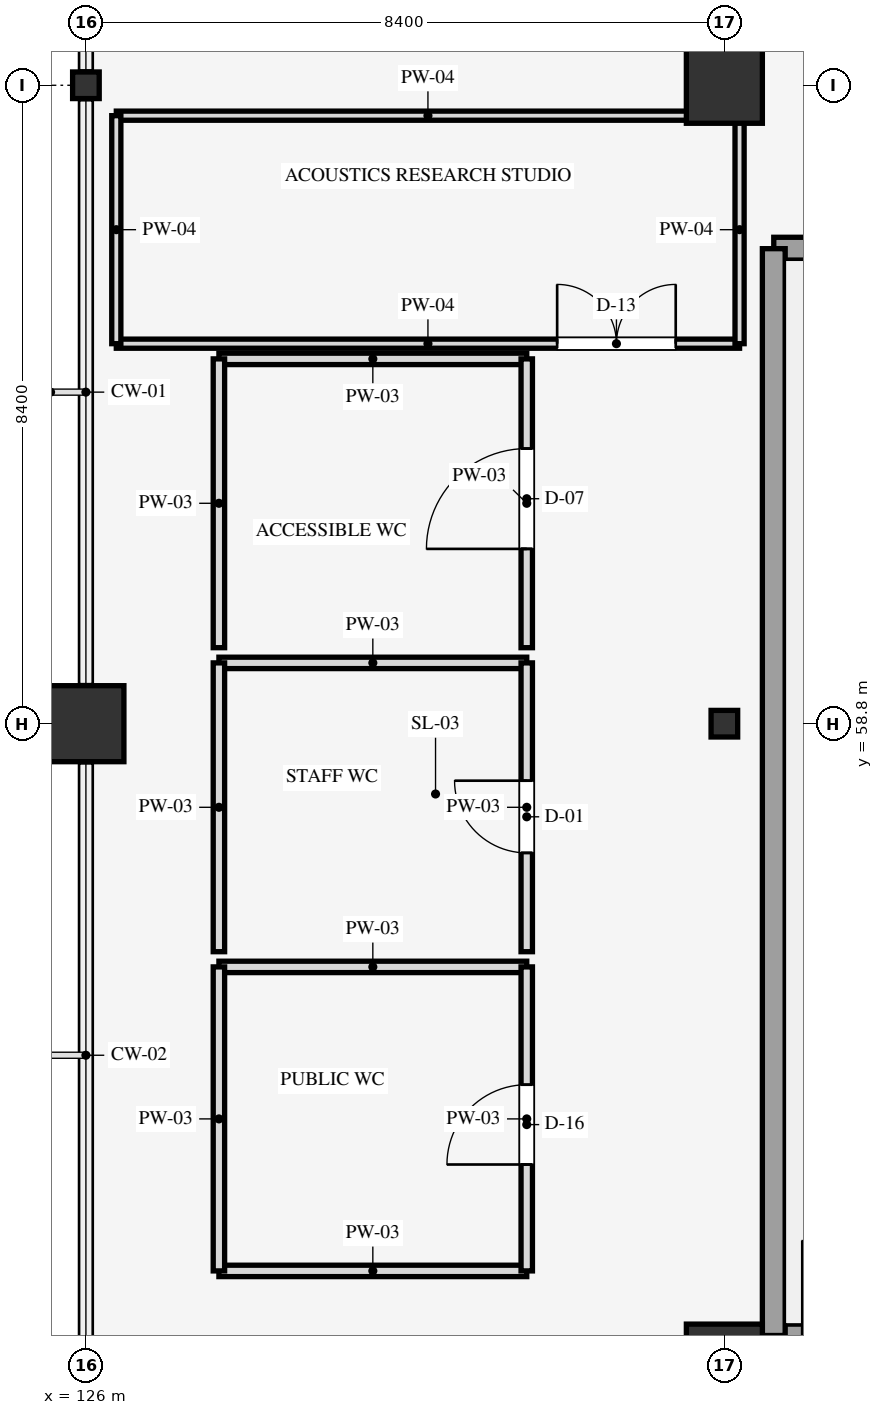
"""IFC4 building model, lengths in metres.
Left out: names, types, materials, properties, quantities, classifications, styles, units other than length and angle.
Written with IfcOpenShell. Run it as: python <this file> out.ifc"""

import sys

from ifc_helpers import new_model, si_unit, direction, frame, frame_2d, origin, origin_2d, place, context, subcontext, project, spatial, rectangle, i_section, extrude, element, fill, save


model = new_model("IFC4")
c1 = context("Model", 3, precision=1e-05, world=origin(), true_north=direction((0.0, 1.0)))
c2 = subcontext(c1, "Body", "Model", "MODEL_VIEW")
j1 = project(units=[si_unit("LENGTHUNIT", "METRE"), si_unit("PLANEANGLEUNIT", "RADIAN")], contexts=[c1])
p1 = place(None, origin())
s1 = spatial("IfcSite", under=j1, at=p1, CompositionType="ELEMENT")
p2 = place(p1, origin())
s2 = spatial("IfcBuilding", under=s1, at=p2, CompositionType="ELEMENT")
p3 = place(p2, frame((0.0, 0.0, 53.1)))
s3 = spatial("IfcBuildingStorey", under=s2, at=p3, CompositionType="ELEMENT", Elevation=53.1)
p4 = place(p3, frame((126.0, 58.8, 0.0), z_axis=(0.0, 0.0, 1.0), x_axis=(1.0, 0.0, 0.0)))
e1 = element("IfcColumn", 1, at=p4, inside=s3, PredefinedType="COLUMN", context=c2, shape_type="SweptSolid", body=[
    extrude(rectangle(XDim=1.0, YDim=1.0, at=origin_2d()), origin(), (0.0, 0.0, 1.0), 4.2),
])
p5 = place(p3, frame((126.0, 67.2, 0.0), z_axis=(0.0, 0.0, 1.0), x_axis=(1.0, 0.0, 0.0)))
e2 = element("IfcColumn", 2, at=p5, inside=s3, PredefinedType="COLUMN", context=c2, shape_type="SweptSolid", body=[
    extrude(i_section(OverallWidth=0.35, OverallDepth=0.35, WebThickness=0.012, FlangeThickness=0.019, FilletRadius=0.02, at=origin_2d()), origin(), (0.0, 0.0, 1.0), 4.2),
])
p6 = place(p3, frame((134.4, 50.4, 0.0), z_axis=(0.0, 0.0, 1.0), x_axis=(1.0, 0.0, 0.0)))
e3 = element("IfcColumn", 3, at=p6, inside=s3, PredefinedType="COLUMN", context=c2, shape_type="SweptSolid", body=[
    extrude(rectangle(XDim=1.0, YDim=1.0, at=origin_2d()), origin(), (0.0, 0.0, 1.0), 4.2),
])
p7 = place(p3, frame((134.4, 58.8, 0.0), z_axis=(0.0, 0.0, 1.0), x_axis=(1.0, 0.0, 0.0)))
e4 = element("IfcColumn", 4, at=p7, inside=s3, PredefinedType="COLUMN", context=c2, shape_type="SweptSolid", body=[
    extrude(i_section(OverallWidth=0.35, OverallDepth=0.35, WebThickness=0.012, FlangeThickness=0.019, FilletRadius=0.02, at=origin_2d()), origin(), (0.0, 0.0, 1.0), 4.2),
])
p8 = place(p3, frame((134.4, 67.2, 0.0), z_axis=(0.0, 0.0, 1.0), x_axis=(1.0, 0.0, 0.0)))
e5 = element("IfcColumn", 5, at=p8, inside=s3, PredefinedType="COLUMN", context=c2, shape_type="SweptSolid", body=[
    extrude(rectangle(XDim=1.0, YDim=1.0, at=origin_2d()), origin(), (0.0, 0.0, 1.0), 4.2),
])
p9 = place(p3, frame((135.05, 50.75, 0.0), z_axis=(0.0, 0.0, 1.0), x_axis=(1.0, 0.0, 0.0)))
e6 = element("IfcWall", 6, at=p9, inside=s3, PredefinedType="SHEAR", context=c2, shape_type="SweptSolid", body=[
    extrude(rectangle(XDim=4.0, YDim=0.3, at=frame_2d((2.0, 0.0))), origin(), (0.0, 0.0, 1.0), 4.2),
])
p10 = place(p9, frame((0.375, 0.0, 0.0)))
e7 = element("IfcOpeningElement", 7, at=p10, cuts=e6, PredefinedType="OPENING", context=c2, shape_type="SweptSolid", body=[
    extrude(rectangle(XDim=1.25, YDim=2.15, at=frame_2d((0.625, 1.075))), frame((0.0, 0.16, 0.0), z_axis=(0.0, -1.0, 0.0), x_axis=(1.0, 0.0, 0.0)), (0.0, 0.0, 1.0), 0.32),
])
p11 = place(p3, frame((135.05, 65.05, 0.0), z_axis=(0.0, 0.0, 1.0), x_axis=(1.0, 0.0, 0.0)))
e8 = element("IfcWall", 8, at=p11, inside=s3, PredefinedType="SHEAR", context=c2, shape_type="SweptSolid", body=[
    extrude(rectangle(XDim=4.0, YDim=0.3, at=frame_2d((2.0, 0.0))), origin(), (0.0, 0.0, 1.0), 4.2),
])
p12 = place(p3, frame((135.05, 50.75, 0.0), z_axis=(0.0, 0.0, 1.0), x_axis=(0.0, 1.0, 0.0)))
e9 = element("IfcWall", 9, at=p12, inside=s3, PredefinedType="SHEAR", context=c2, shape_type="SweptSolid", body=[
    extrude(rectangle(XDim=14.3, YDim=0.3, at=frame_2d((7.15, 0.0))), origin(), (0.0, 0.0, 1.0), 4.2),
])
for number, where, z_axis, x_axis in (
    (10, (127.75, 51.6, 0.0), (0.0, 0.0, 1.0), (1.0, 0.0, 0.0)),
    (11, (127.75, 55.6, 0.0), (0.0, 0.0, 1.0), (1.0, 0.0, 0.0)),
):
    element("IfcWall", number, at=place(p3, frame(where, z_axis=z_axis, x_axis=x_axis)), inside=s3, PredefinedType="PARTITIONING", context=c2, shape_type="SweptSolid", body=[
        extrude(rectangle(XDim=4.05, YDim=0.15, at=frame_2d((2.025, 0.0))), origin(), (0.0, 0.0, 1.0), 3.24),
    ])
p13 = place(p3, frame((127.75, 51.6, 0.0), z_axis=(0.0, 0.0, 1.0), x_axis=(0.0, 1.0, 0.0)))
e12 = element("IfcWall", 12, at=p13, inside=s3, PredefinedType="PARTITIONING", context=c2, shape_type="SweptSolid", body=[
    extrude(rectangle(XDim=4.0, YDim=0.15, at=frame_2d((2.0, 0.0))), origin(), (0.0, 0.0, 1.0), 3.24),
])
p14 = place(p3, frame((131.8, 51.6, 0.0), z_axis=(0.0, 0.0, 1.0), x_axis=(0.0, 1.0, 0.0)))
e13 = element("IfcWall", 13, at=p14, inside=s3, PredefinedType="PARTITIONING", context=c2, shape_type="SweptSolid", body=[
    extrude(rectangle(XDim=4.0, YDim=0.15, at=frame_2d((2.0, 0.0))), origin(), (0.0, 0.0, 1.0), 3.24),
])
p15 = place(p14, frame((1.4, 0.0, 0.0)))
e14 = element("IfcOpeningElement", 14, at=p15, cuts=e13, PredefinedType="OPENING", context=c2, shape_type="SweptSolid", body=[
    extrude(rectangle(XDim=1.05, YDim=2.16, at=frame_2d((0.525, 1.08))), frame((0.0, 0.085, 0.0), z_axis=(0.0, -1.0, 0.0), x_axis=(1.0, 0.0, 0.0)), (0.0, 0.0, 1.0), 0.17),
])
p16 = place(p3, frame((127.75, 59.6, 0.0), z_axis=(0.0, 0.0, 1.0), x_axis=(1.0, 0.0, 0.0)))
e15 = element("IfcWall", 15, at=p16, inside=s3, PredefinedType="PARTITIONING", context=c2, shape_type="SweptSolid", body=[
    extrude(rectangle(XDim=4.05, YDim=0.15, at=frame_2d((2.025, 0.0))), origin(), (0.0, 0.0, 1.0), 3.24),
])
p17 = place(p3, frame((127.75, 55.8, 0.0), z_axis=(0.0, 0.0, 1.0), x_axis=(0.0, 1.0, 0.0)))
e16 = element("IfcWall", 16, at=p17, inside=s3, PredefinedType="PARTITIONING", context=c2, shape_type="SweptSolid", body=[
    extrude(rectangle(XDim=3.8, YDim=0.15, at=frame_2d((1.9, 0.0))), origin(), (0.0, 0.0, 1.0), 3.24),
])
p18 = place(p3, frame((131.8, 55.8, 0.0), z_axis=(0.0, 0.0, 1.0), x_axis=(0.0, 1.0, 0.0)))
e17 = element("IfcWall", 17, at=p18, inside=s3, PredefinedType="PARTITIONING", context=c2, shape_type="SweptSolid", body=[
    extrude(rectangle(XDim=3.8, YDim=0.15, at=frame_2d((1.9, 0.0))), origin(), (0.0, 0.0, 1.0), 3.24),
])
p19 = place(p18, frame((1.3, 0.0, 0.0)))
e18 = element("IfcOpeningElement", 18, at=p19, cuts=e17, PredefinedType="OPENING", context=c2, shape_type="SweptSolid", body=[
    extrude(rectangle(XDim=0.95, YDim=2.1, at=frame_2d((0.475, 1.05))), frame((0.0, 0.085, 0.0), z_axis=(0.0, -1.0, 0.0), x_axis=(1.0, 0.0, 0.0)), (0.0, 0.0, 1.0), 0.17),
])
p20 = place(p3, frame((127.75, 63.6, 0.0), z_axis=(0.0, 0.0, 1.0), x_axis=(1.0, 0.0, 0.0)))
e19 = element("IfcWall", 19, at=p20, inside=s3, PredefinedType="PARTITIONING", context=c2, shape_type="SweptSolid", body=[
    extrude(rectangle(XDim=4.05, YDim=0.15, at=frame_2d((2.025, 0.0))), origin(), (0.0, 0.0, 1.0), 3.24),
])
p21 = place(p3, frame((127.75, 59.8, 0.0), z_axis=(0.0, 0.0, 1.0), x_axis=(0.0, 1.0, 0.0)))
e20 = element("IfcWall", 20, at=p21, inside=s3, PredefinedType="PARTITIONING", context=c2, shape_type="SweptSolid", body=[
    extrude(rectangle(XDim=3.8, YDim=0.15, at=frame_2d((1.9, 0.0))), origin(), (0.0, 0.0, 1.0), 3.24),
])
p22 = place(p3, frame((131.8, 59.8, 0.0), z_axis=(0.0, 0.0, 1.0), x_axis=(0.0, 1.0, 0.0)))
e21 = element("IfcWall", 21, at=p22, inside=s3, PredefinedType="PARTITIONING", context=c2, shape_type="SweptSolid", body=[
    extrude(rectangle(XDim=3.8, YDim=0.15, at=frame_2d((1.9, 0.0))), origin(), (0.0, 0.0, 1.0), 3.24),
])
p23 = place(p22, frame((1.3, 0.0, 0.0)))
e22 = element("IfcOpeningElement", 22, at=p23, cuts=e21, PredefinedType="OPENING", context=c2, shape_type="SweptSolid", body=[
    extrude(rectangle(XDim=1.32, YDim=2.18, at=frame_2d((0.66, 1.09))), frame((0.0, 0.085, 0.0), z_axis=(0.0, -1.0, 0.0), x_axis=(1.0, 0.0, 0.0)), (0.0, 0.0, 1.0), 0.17),
])
p24 = place(p3, frame((126.4, 63.8, 0.0), z_axis=(0.0, 0.0, 1.0), x_axis=(1.0, 0.0, 0.0)))
e23 = element("IfcWall", 23, at=p24, inside=s3, PredefinedType="PARTITIONING", context=c2, shape_type="SweptSolid", body=[
    extrude(rectangle(XDim=8.2, YDim=0.12, at=frame_2d((4.1, 0.0))), origin(), (0.0, 0.0, 1.0), 3.24),
])
p25 = place(p24, frame((5.8, 0.0, 0.0)))
e24 = element("IfcOpeningElement", 24, at=p25, cuts=e23, PredefinedType="OPENING", context=c2, shape_type="SweptSolid", body=[
    extrude(rectangle(XDim=1.56, YDim=2.2, at=frame_2d((0.78, 1.1))), frame((0.0, 0.07, 0.0), z_axis=(0.0, -1.0, 0.0), x_axis=(1.0, 0.0, 0.0)), (0.0, 0.0, 1.0), 0.14),
])
p26 = place(p3, frame((126.4, 66.8, 0.0), z_axis=(0.0, 0.0, 1.0), x_axis=(1.0, 0.0, 0.0)))
e25 = element("IfcWall", 25, at=p26, inside=s3, PredefinedType="PARTITIONING", context=c2, shape_type="SweptSolid", body=[
    extrude(rectangle(XDim=8.2, YDim=0.12, at=frame_2d((4.1, 0.0))), origin(), (0.0, 0.0, 1.0), 3.24),
])
for number, where, z_axis, x_axis in (
    (26, (126.4, 63.8, 0.0), (0.0, 0.0, 1.0), (0.0, 1.0, 0.0)),
    (27, (134.6, 63.8, 0.0), (0.0, 0.0, 1.0), (0.0, 1.0, 0.0)),
):
    element("IfcWall", number, at=place(p3, frame(where, z_axis=z_axis, x_axis=x_axis)), inside=s3, PredefinedType="PARTITIONING", context=c2, shape_type="SweptSolid", body=[
        extrude(rectangle(XDim=3.0, YDim=0.12, at=frame_2d((1.5, 0.0))), origin(), (0.0, 0.0, 1.0), 3.24),
    ])
p27 = place(p10, origin())
e28 = element("IfcDoor", 28, at=p27, inside=s3, OperationType="SINGLE_SWING_LEFT", PredefinedType="DOOR", context=c2, shape_type="SweptSolid", body=[
    extrude(rectangle(XDim=1.25, YDim=2.15, at=frame_2d((0.625, 1.075))), frame((0.0, 0.025, 0.0), z_axis=(0.0, -1.0, 0.0), x_axis=(1.0, 0.0, 0.0)), (0.0, 0.0, 1.0), 0.05),
])
fill(e7, e28)
p28 = place(p15, origin())
e29 = element("IfcDoor", 29, at=p28, inside=s3, OperationType="SINGLE_SWING_LEFT", PredefinedType="DOOR", context=c2, shape_type="SweptSolid", body=[
    extrude(rectangle(XDim=1.05, YDim=2.16, at=frame_2d((0.525, 1.08))), frame((0.0, 0.025, 0.0), z_axis=(0.0, -1.0, 0.0), x_axis=(1.0, 0.0, 0.0)), (0.0, 0.0, 1.0), 0.05),
])
fill(e14, e29)
p29 = place(p19, origin())
e30 = element("IfcDoor", 30, at=p29, inside=s3, OperationType="SINGLE_SWING_RIGHT", PredefinedType="DOOR", context=c2, shape_type="SweptSolid", body=[
    extrude(rectangle(XDim=0.95, YDim=2.1, at=frame_2d((0.475, 1.05))), frame((0.0, 0.025, 0.0), z_axis=(0.0, -1.0, 0.0), x_axis=(1.0, 0.0, 0.0)), (0.0, 0.0, 1.0), 0.05),
])
fill(e18, e30)
p30 = place(p23, origin())
e31 = element("IfcDoor", 31, at=p30, inside=s3, OperationType="SINGLE_SWING_LEFT", PredefinedType="DOOR", context=c2, shape_type="SweptSolid", body=[
    extrude(rectangle(XDim=1.32, YDim=2.18, at=frame_2d((0.66, 1.09))), frame((0.0, 0.025, 0.0), z_axis=(0.0, -1.0, 0.0), x_axis=(1.0, 0.0, 0.0)), (0.0, 0.0, 1.0), 0.05),
])
fill(e22, e31)
p31 = place(p25, origin())
e32 = element("IfcDoor", 32, at=p31, inside=s3, OperationType="DOUBLE_DOOR_SINGLE_SWING", PredefinedType="DOOR", context=c2, shape_type="SweptSolid", body=[
    extrude(rectangle(XDim=1.56, YDim=2.2, at=frame_2d((0.78, 1.1))), frame((0.0, 0.025, 0.0), z_axis=(0.0, -1.0, 0.0), x_axis=(1.0, 0.0, 0.0)), (0.0, 0.0, 1.0), 0.05),
])
fill(e24, e32)
save(model, sys.argv[1])
